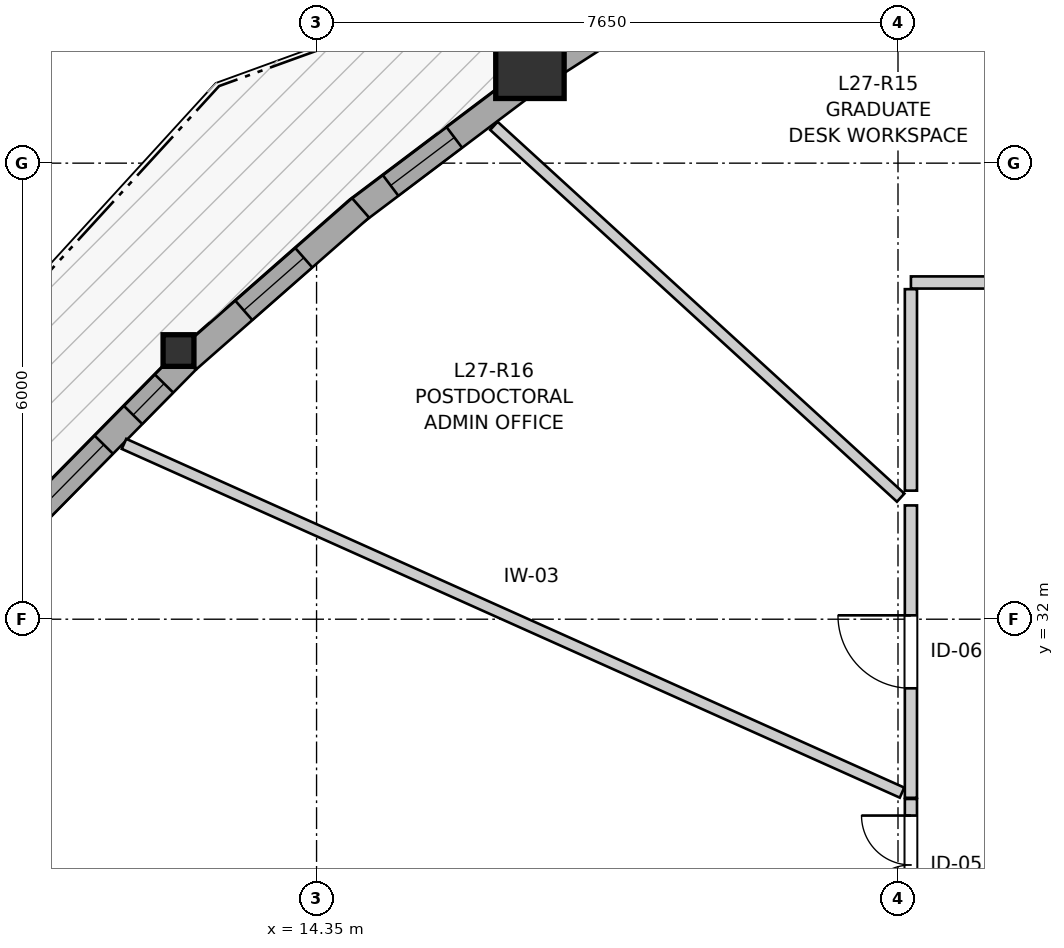
"""IFC4 building model, lengths in metres.
Left out: names, types, materials, properties, quantities, classifications, styles, units other than length and angle.
Written with IfcOpenShell. Run it as: python <this file> out.ifc"""

import sys

from ifc_helpers import new_model, si_unit, direction, frame, frame_2d, origin, origin_2d, place, context, subcontext, project, spatial, rectangle, i_section, extrude, source, transform, mapped, element, fill, save


model = new_model("IFC4")
c1 = context("Model", 3, precision=1e-05, world=origin(), true_north=direction((0.0, 1.0)))
c2 = subcontext(c1, "Body", "Model", "MODEL_VIEW")
j1 = project(units=[si_unit("LENGTHUNIT", "METRE"), si_unit("PLANEANGLEUNIT", "RADIAN")], contexts=[c1])
p1 = place(None, origin())
s1 = spatial("IfcSite", under=j1, at=p1, CompositionType="ELEMENT")
p2 = place(p1, origin())
s2 = spatial("IfcBuilding", under=s1, at=p2, CompositionType="ELEMENT")
p3 = place(p2, frame((0.0, 0.0, 92.8)))
s3 = spatial("IfcBuildingStorey", under=s2, at=p3, CompositionType="ELEMENT", Elevation=92.8)
m1 = source(origin(), c2, "Body", "SweptSolid", [
    extrude(rectangle(XDim=0.9, YDim=0.9, at=origin_2d()), origin(), (0.0, 0.0, 1.0), 2.95),
])
p4 = place(p3, frame((17.157, 39.301, 0.0), z_axis=(0.0, 0.0, 1.0), x_axis=(1.0, 0.0, 0.0)))
e1 = element("IfcColumn", 1, at=p4, inside=s3, PredefinedType="COLUMN", context=c2, shape_type="MappedRepresentation", body=[
    mapped(m1, transform((0.0, 0.0, 0.0), x_axis=(1.0, 0.0, 0.0), y_axis=(0.0, 1.0, 0.0), z_axis=(0.0, 0.0, 1.0), scale=1.0)),
])
m2 = source(origin(), c2, "Body", "SweptSolid", [
    extrude(i_section(OverallWidth=0.406, OverallDepth=0.416, WebThickness=0.027, FlangeThickness=0.044, FilletRadius=0.015, at=origin_2d()), origin(), (0.0, 0.0, 1.0), 2.95),
])
p5 = place(p3, frame((12.534, 35.535, 0.0), z_axis=(0.0, 0.0, 1.0), x_axis=(1.0, 0.0, 0.0)))
e2 = element("IfcColumn", 2, at=p5, inside=s3, PredefinedType="PILASTER", context=c2, shape_type="MappedRepresentation", body=[
    mapped(m2, transform((0.0, 0.0, 0.0), x_axis=(1.0, 0.0, 0.0), y_axis=(0.0, 1.0, 0.0), z_axis=(0.0, 0.0, 1.0), scale=1.0)),
])
p6 = place(p3, frame((19.764, 40.772, 0.0), z_axis=(0.0, 0.0, 1.0), x_axis=(-0.841500460675, -0.54025639717, 0.0)))
e3 = element("IfcWall", 3, at=p6, inside=s3, PredefinedType="SOLIDWALL", context=c2, shape_type="SweptSolid", body=[
    extrude(rectangle(XDim=2.758, YDim=0.34, at=frame_2d((1.379, 0.0))), origin(), (0.0, 0.0, 1.0), 2.48),
])
p7 = place(p6, frame((0.709, 0.0, 0.82)))
e4 = element("IfcOpeningElement", 4, at=p7, cuts=e3, PredefinedType="OPENING", context=c2, shape_type="SweptSolid", body=[
    extrude(rectangle(XDim=1.35, YDim=1.45, at=frame_2d((0.675, 0.725))), frame((0.0, 0.18, 0.0), z_axis=(0.0, -1.0, 0.0), x_axis=(1.0, 0.0, 0.0)), (0.0, 0.0, 1.0), 0.36),
])
p8 = place(p3, frame((17.076, 39.027, 0.0), z_axis=(0.0, 0.0, 1.0), x_axis=(-0.798403009583, -0.602123437751, 0.0)))
e5 = element("IfcWall", 5, at=p8, inside=s3, PredefinedType="SOLIDWALL", context=c2, shape_type="SweptSolid", body=[
    extrude(rectangle(XDim=2.775, YDim=0.34, at=frame_2d((1.387, 0.0))), origin(), (0.0, 0.0, 1.0), 2.48),
])
p9 = place(p8, frame((1.144, 0.0, 0.82)))
e6 = element("IfcOpeningElement", 6, at=p9, cuts=e5, PredefinedType="OPENING", context=c2, shape_type="SweptSolid", body=[
    extrude(rectangle(XDim=1.05, YDim=1.45, at=frame_2d((0.525, 0.725))), frame((0.0, 0.18, 0.0), z_axis=(0.0, -1.0, 0.0), x_axis=(1.0, 0.0, 0.0)), (0.0, 0.0, 1.0), 0.36),
])
p10 = place(p3, frame((14.929, 37.412, 0.0), z_axis=(0.0, 0.0, 1.0), x_axis=(-0.751438268977, -0.659803400959, 0.0)))
e7 = element("IfcWall", 7, at=p10, inside=s3, PredefinedType="SOLIDWALL", context=c2, shape_type="SweptSolid", body=[
    extrude(rectangle(XDim=3.019, YDim=0.34, at=frame_2d((1.509, 0.0))), origin(), (0.0, 0.0, 1.0), 2.48),
])
p11 = place(p10, frame((0.994, 0.0, 0.82)))
e8 = element("IfcOpeningElement", 8, at=p11, cuts=e7, PredefinedType="OPENING", context=c2, shape_type="SweptSolid", body=[
    extrude(rectangle(XDim=1.05, YDim=1.45, at=frame_2d((0.525, 0.725))), frame((0.0, 0.18, 0.0), z_axis=(0.0, -1.0, 0.0), x_axis=(1.0, 0.0, 0.0)), (0.0, 0.0, 1.0), 0.36),
])
p12 = place(p3, frame((12.641, 35.401, 0.0), z_axis=(0.0, 0.0, 1.0), x_axis=(-0.701955968499, -0.712220343917, 0.0)))
e9 = element("IfcWall", 9, at=p12, inside=s3, PredefinedType="SOLIDWALL", context=c2, shape_type="SweptSolid", body=[
    extrude(rectangle(XDim=3.068, YDim=0.34, at=frame_2d((1.534, 0.0))), origin(), (0.0, 0.0, 1.0), 2.48),
])
p13 = place(p12, frame((0.423, 0.0, 0.82)))
e10 = element("IfcOpeningElement", 10, at=p13, cuts=e9, PredefinedType="OPENING", context=c2, shape_type="SweptSolid", body=[
    extrude(rectangle(XDim=0.58, YDim=1.35, at=frame_2d((0.29, 0.675))), frame((0.0, 0.18, 0.0), z_axis=(0.0, -1.0, 0.0), x_axis=(1.0, 0.0, 0.0)), (0.0, 0.0, 1.0), 0.36),
])
p14 = place(p12, frame((1.552, 0.0, 0.82)))
e11 = element("IfcOpeningElement", 11, at=p14, cuts=e9, PredefinedType="OPENING", context=c2, shape_type="SweptSolid", body=[
    extrude(rectangle(XDim=1.25, YDim=1.35, at=frame_2d((0.625, 0.675))), frame((0.0, 0.18, 0.0), z_axis=(0.0, -1.0, 0.0), x_axis=(1.0, 0.0, 0.0)), (0.0, 0.0, 1.0), 0.36),
])
p15 = place(p3, frame((22.17, 36.43, 0.0), z_axis=(0.0, 0.0, 1.0), x_axis=(1.0, 0.0, 0.0)))
e12 = element("IfcWall", 12, at=p15, inside=s3, PredefinedType="PARTITIONING", context=c2, shape_type="SweptSolid", body=[
    extrude(rectangle(XDim=4.767, YDim=0.16, at=frame_2d((2.384, 0.0))), origin(), (0.0, 0.0, 1.0), 2.588),
])
p16 = place(p15, frame((1.896, 0.0, 0.0)))
e13 = element("IfcOpeningElement", 13, at=p16, cuts=e12, PredefinedType="OPENING", context=c2, shape_type="SweptSolid", body=[
    extrude(rectangle(XDim=0.96, YDim=2.1, at=frame_2d((0.48, 1.05))), frame((0.0, 0.09, 0.0), z_axis=(0.0, -1.0, 0.0), x_axis=(1.0, 0.0, 0.0)), (0.0, 0.0, 1.0), 0.18),
])
p17 = place(p3, frame((22.17, 29.65, 0.0), z_axis=(0.0, 0.0, 1.0), x_axis=(0.0, 1.0, 0.0)))
e14 = element("IfcWall", 14, at=p17, inside=s3, PredefinedType="PARTITIONING", context=c2, shape_type="SweptSolid", body=[
    extrude(rectangle(XDim=3.847, YDim=0.16, at=frame_2d((1.924, 0.0))), origin(), (0.0, 0.0, 1.0), 2.95),
])
p18 = place(p17, frame((1.441, 0.0, 0.0)))
e15 = element("IfcOpeningElement", 15, at=p18, cuts=e14, PredefinedType="OPENING", context=c2, shape_type="SweptSolid", body=[
    extrude(rectangle(XDim=0.96, YDim=2.1, at=frame_2d((0.48, 1.05))), frame((0.0, 0.09, 0.0), z_axis=(0.0, -1.0, 0.0), x_axis=(1.0, 0.0, 0.0)), (0.0, 0.0, 1.0), 0.18),
])
p19 = place(p3, frame((22.17, 27.85, 0.0), z_axis=(0.0, 0.0, 1.0), x_axis=(0.0, 1.0, 0.0)))
e16 = element("IfcWall", 16, at=p19, inside=s3, PredefinedType="PARTITIONING", context=c2, shape_type="SweptSolid", body=[
    extrude(rectangle(XDim=1.785, YDim=0.16, at=frame_2d((0.893, 0.0))), origin(), (0.0, 0.0, 1.0), 2.95),
])
p20 = place(p19, frame((0.267, 0.0, 0.0)))
e17 = element("IfcOpeningElement", 17, at=p20, cuts=e16, PredefinedType="OPENING", context=c2, shape_type="SweptSolid", body=[
    extrude(rectangle(XDim=1.3, YDim=2.1, at=frame_2d((0.65, 1.05))), frame((0.0, 0.09, 0.0), z_axis=(0.0, -1.0, 0.0), x_axis=(1.0, 0.0, 0.0)), (0.0, 0.0, 1.0), 0.18),
])
p21 = place(p3, frame((11.817, 34.307, 0.0), z_axis=(0.0, 0.0, 1.0), x_axis=(0.912528092457, -0.409014034572, 0.0)))
e18 = element("IfcWall", 18, at=p21, inside=s3, PredefinedType="PARTITIONING", context=c2, shape_type="SweptSolid", body=[
    extrude(rectangle(XDim=11.218, YDim=0.145, at=frame_2d((5.609, 0.0))), origin(), (0.0, 0.0, 1.0), 2.95),
])
p22 = place(p3, frame((16.683, 38.491, 0.0), z_axis=(0.0, 0.0, 1.0), x_axis=(0.738145700324, -0.674641330704, 0.0)))
e19 = element("IfcWall", 19, at=p22, inside=s3, PredefinedType="PARTITIONING", context=c2, shape_type="SweptSolid", body=[
    extrude(rectangle(XDim=7.251, YDim=0.145, at=frame_2d((3.625, 0.0))), origin(), (0.0, 0.0, 1.0), 2.95),
])
p23 = place(p3, frame((22.17, 33.691, 0.0), z_axis=(0.0, 0.0, 1.0), x_axis=(0.0, 1.0, 0.0)))
e20 = element("IfcWall", 20, at=p23, inside=s3, PredefinedType="PARTITIONING", context=c2, shape_type="SweptSolid", body=[
    extrude(rectangle(XDim=2.651, YDim=0.16, at=frame_2d((1.325, 0.0))), origin(), (0.0, 0.0, 1.0), 2.95),
])
m3 = source(origin(), c2, "Body", "SweptSolid", [
    extrude(rectangle(XDim=1.05, YDim=1.45, at=frame_2d((0.525, 0.725))), frame((0.0, 0.03, 0.0), z_axis=(0.0, -1.0, 0.0), x_axis=(1.0, 0.0, 0.0)), (0.0, 0.0, 1.0), 0.06),
])
p24 = place(p9, origin())
e21 = element("IfcWindow", 21, at=p24, inside=s3, PartitioningType="SINGLE_PANEL", PredefinedType="WINDOW", context=c2, shape_type="MappedRepresentation", body=[
    mapped(m3, transform((0.0, 0.0, 0.0), x_axis=(1.0, 0.0, 0.0), y_axis=(0.0, 1.0, 0.0), z_axis=(0.0, 0.0, 1.0), scale=1.0)),
])
fill(e6, e21)
p25 = place(p11, origin())
e22 = element("IfcWindow", 22, at=p25, inside=s3, PartitioningType="SINGLE_PANEL", PredefinedType="WINDOW", context=c2, shape_type="MappedRepresentation", body=[
    mapped(m3, transform((0.0, 0.0, 0.0), x_axis=(1.0, 0.0, 0.0), y_axis=(0.0, 1.0, 0.0), z_axis=(0.0, 0.0, 1.0), scale=1.0)),
])
fill(e8, e22)
m4 = source(origin(), c2, "Body", "SweptSolid", [
    extrude(rectangle(XDim=0.58, YDim=1.35, at=frame_2d((0.29, 0.675))), frame((0.0, 0.03, 0.0), z_axis=(0.0, -1.0, 0.0), x_axis=(1.0, 0.0, 0.0)), (0.0, 0.0, 1.0), 0.06),
])
p26 = place(p13, origin())
e23 = element("IfcWindow", 23, at=p26, inside=s3, PartitioningType="SINGLE_PANEL", PredefinedType="WINDOW", context=c2, shape_type="MappedRepresentation", body=[
    mapped(m4, transform((0.0, 0.0, 0.0), x_axis=(1.0, 0.0, 0.0), y_axis=(0.0, 1.0, 0.0), z_axis=(0.0, 0.0, 1.0), scale=1.0)),
])
fill(e10, e23)
m5 = source(origin(), c2, "Body", "SweptSolid", [
    extrude(rectangle(XDim=1.25, YDim=1.35, at=frame_2d((0.625, 0.675))), frame((0.0, 0.03, 0.0), z_axis=(0.0, -1.0, 0.0), x_axis=(1.0, 0.0, 0.0)), (0.0, 0.0, 1.0), 0.06),
])
p27 = place(p14, origin())
e24 = element("IfcWindow", 24, at=p27, inside=s3, PartitioningType="SINGLE_PANEL", PredefinedType="WINDOW", context=c2, shape_type="MappedRepresentation", body=[
    mapped(m5, transform((0.0, 0.0, 0.0), x_axis=(1.0, 0.0, 0.0), y_axis=(0.0, 1.0, 0.0), z_axis=(0.0, 0.0, 1.0), scale=1.0)),
])
fill(e11, e24)
m6 = source(origin(), c2, "Body", "SweptSolid", [
    extrude(rectangle(XDim=0.96, YDim=2.1, at=frame_2d((0.48, 1.05))), frame((0.0, 0.025, 0.0), z_axis=(0.0, -1.0, 0.0), x_axis=(1.0, 0.0, 0.0)), (0.0, 0.0, 1.0), 0.05),
])
p28 = place(p18, origin())
e25 = element("IfcDoor", 25, at=p28, inside=s3, OperationType="SINGLE_SWING_RIGHT", PredefinedType="DOOR", context=c2, shape_type="MappedRepresentation", body=[
    mapped(m6, transform((0.0, 0.0, 0.0), x_axis=(1.0, 0.0, 0.0), y_axis=(0.0, 1.0, 0.0), z_axis=(0.0, 0.0, 1.0), scale=1.0)),
])
fill(e15, e25)
m7 = source(origin(), c2, "Body", "SweptSolid", [
    extrude(rectangle(XDim=1.3, YDim=2.1, at=frame_2d((0.65, 1.05))), frame((0.0, 0.025, 0.0), z_axis=(0.0, -1.0, 0.0), x_axis=(1.0, 0.0, 0.0)), (0.0, 0.0, 1.0), 0.05),
])
p29 = place(p20, origin())
e26 = element("IfcDoor", 26, at=p29, inside=s3, OperationType="DOUBLE_DOOR_SINGLE_SWING", PredefinedType="DOOR", context=c2, shape_type="MappedRepresentation", body=[
    mapped(m7, transform((0.0, 0.0, 0.0), x_axis=(1.0, 0.0, 0.0), y_axis=(0.0, 1.0, 0.0), z_axis=(0.0, 0.0, 1.0), scale=1.0)),
])
fill(e17, e26)
save(model, sys.argv[1])
